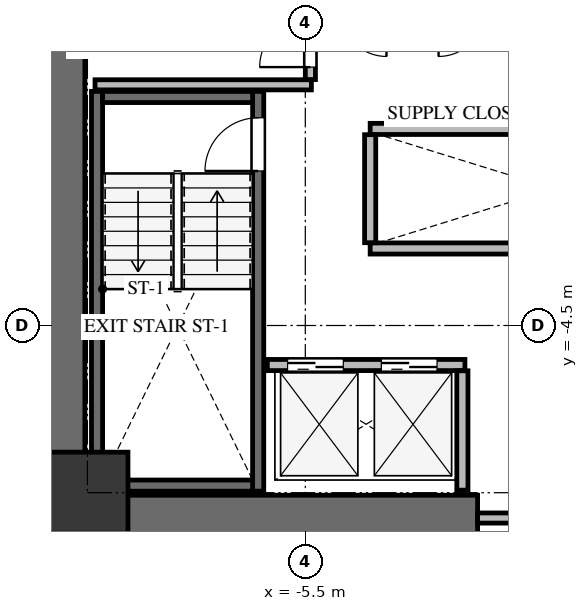
"""IFC4 building model, lengths in metres.
Left out: names, types, materials, properties, quantities, classifications, styles, units other than length and angle.
Written with IfcOpenShell. Run it as: python <this file> out.ifc"""

import sys

from ifc_helpers import new_model, si_unit, direction, frame, frame_2d, origin, origin_2d, place, context, subcontext, project, spatial, rectangle, extrude, source, transform, mapped, element, fill, save


model = new_model("IFC4")
c1 = context("Model", 3, precision=1e-05, world=origin(), true_north=direction((0.0, 1.0)))
c2 = subcontext(c1, "Body", "Model", "MODEL_VIEW")
j1 = project(units=[si_unit("LENGTHUNIT", "METRE"), si_unit("PLANEANGLEUNIT", "RADIAN")], contexts=[c1])
p1 = place(None, origin())
s1 = spatial("IfcSite", under=j1, at=p1, CompositionType="ELEMENT")
p2 = place(p1, origin())
s2 = spatial("IfcBuilding", under=s1, at=p2, CompositionType="ELEMENT")
p3 = place(p2, frame((0.0, 0.0, 78.3)))
s3 = spatial("IfcBuildingStorey", under=s2, at=p3, CompositionType="ELEMENT", Elevation=78.3)
p4 = place(p3, frame((-10.3, -8.75, 0.0), z_axis=(0.0, 0.0, 1.0), x_axis=(0.0, 1.0, 0.0)))
e1 = element("IfcWall", 1, at=p4, inside=s3, PredefinedType="SHEAR", context=c2, shape_type="SweptSolid", body=[
    extrude(rectangle(XDim=17.5, YDim=0.9, at=frame_2d((8.75, 0.0))), origin(), (0.0, 0.0, 1.0), 3.0),
])
p5 = place(p3, frame((-9.85, -8.3, 0.0), z_axis=(0.0, 0.0, 1.0), x_axis=(1.0, 0.0, 0.0)))
e2 = element("IfcWall", 2, at=p5, inside=s3, PredefinedType="SHEAR", context=c2, shape_type="SweptSolid", body=[
    extrude(rectangle(XDim=7.75, YDim=0.9, at=frame_2d((3.875, 0.0))), origin(), (0.0, 0.0, 1.0), 3.0),
])
p6 = place(p3, frame((-6.43, -7.77, -0.24), z_axis=(0.0, 0.0, 1.0), x_axis=(0.0, 1.0, 0.0)))
e3 = element("IfcWall", 3, at=p6, inside=s3, PredefinedType="SHEAR", context=c2, shape_type="SweptSolid", body=[
    extrude(rectangle(XDim=7.89, YDim=0.22, at=frame_2d((3.945, 0.0))), origin(), (0.0, 0.0, 1.0), 3.0),
])
p7 = place(p6, frame((6.32, 0.0, 0.0)))
e4 = element("IfcOpeningElement", 4, at=p7, cuts=e3, PredefinedType="OPENING", context=c2, shape_type="SweptSolid", body=[
    extrude(rectangle(XDim=1.05, YDim=2.15, at=frame_2d((0.525, 1.075))), frame((0.0, 0.12, 0.0), z_axis=(0.0, -1.0, 0.0), x_axis=(1.0, 0.0, 0.0)), (0.0, 0.0, 1.0), 0.24),
])
p8 = place(p3, frame((-9.61, 0.12, -0.24), z_axis=(0.0, 0.0, 1.0), x_axis=(0.0, -1.0, 0.0)))
e5 = element("IfcWall", 5, at=p8, inside=s3, PredefinedType="SHEAR", context=c2, shape_type="SweptSolid", body=[
    extrude(rectangle(XDim=7.89, YDim=0.22, at=frame_2d((3.945, 0.0))), origin(), (0.0, 0.0, 1.0), 3.0),
])
for number, where, z_axis, x_axis in (
    (6, (-9.5, -7.66, -0.24), (0.0, 0.0, 1.0), (1.0, 0.0, 0.0)),
    (7, (-6.54, 0.01, -0.24), (0.0, 0.0, 1.0), (-1.0, 0.0, 0.0)),
):
    element("IfcWall", number, at=place(p3, frame(where, z_axis=z_axis, x_axis=x_axis)), inside=s3, PredefinedType="SHEAR", context=c2, shape_type="SweptSolid", body=[
        extrude(rectangle(XDim=2.96, YDim=0.22, at=frame_2d((1.48, 0.0))), origin(), (0.0, 0.0, 1.0), 3.0),
    ])
m1 = source(origin(), c2, "Body", "SweptSolid", [
    extrude(rectangle(XDim=1.6, YDim=1.6, at=origin_2d()), origin(), (0.0, 0.0, 1.0), 3.0),
])
p9 = place(p3, frame((-9.8, -7.8, -0.24), z_axis=(0.0, 0.0, 1.0), x_axis=(1.0, 0.0, 0.0)))
e8 = element("IfcColumn", 8, at=p9, inside=s3, PredefinedType="COLUMN", context=c2, shape_type="MappedRepresentation", body=[
    mapped(m1, transform((0.0, 0.0, 0.0), x_axis=(1.0, 0.0, 0.0), y_axis=(0.0, 1.0, 0.0), z_axis=(0.0, 0.0, 1.0), scale=1.0)),
])
p10 = place(p3, frame((-2.1, -8.3, 0.0), z_axis=(0.0, 0.0, 1.0), x_axis=(1.0, 0.0, 0.0)))
e9 = element("IfcWall", 9, at=p10, inside=s3, PredefinedType="SOLIDWALL", context=c2, shape_type="SweptSolid", body=[
    extrude(rectangle(XDim=4.2, YDim=0.2, at=frame_2d((2.1, 0.0))), origin(), (0.0, 0.0, 1.0), 2.745),
])
p11 = place(p10, frame((1.2, 0.0, 0.0)))
e10 = element("IfcOpeningElement", 10, at=p11, cuts=e9, PredefinedType="OPENING", context=c2, shape_type="SweptSolid", body=[
    extrude(rectangle(XDim=1.8, YDim=2.15, at=frame_2d((0.9, 1.075))), frame((0.0, 0.11, 0.0), z_axis=(0.0, -1.0, 0.0), x_axis=(1.0, 0.0, 0.0)), (0.0, 0.0, 1.0), 0.22),
])
p12 = place(p3, frame((-9.65, 0.25, 0.0), z_axis=(0.0, 0.0, 1.0), x_axis=(1.0, 0.0, 0.0)))
e11 = element("IfcWall", 11, at=p12, inside=s3, PredefinedType="SOLIDWALL", context=c2, shape_type="SweptSolid", body=[
    extrude(rectangle(XDim=4.27, YDim=0.2, at=frame_2d((2.135, 0.0))), origin(), (0.0, 0.0, 1.0), 2.745),
])
p13 = place(p3, frame((-5.4, 0.354, 0.0), z_axis=(0.0, 0.0, 1.0), x_axis=(0.0, 1.0, 0.0)))
e12 = element("IfcWall", 12, at=p13, inside=s3, PredefinedType="SOLIDWALL", context=c2, shape_type="SweptSolid", body=[
    extrude(rectangle(XDim=4.026, YDim=0.2, at=frame_2d((2.013, 0.0))), origin(), (0.0, 0.0, 1.0), 2.745),
])
p14 = place(p13, frame((0.246, 0.0, 0.0)))
e13 = element("IfcOpeningElement", 13, at=p14, cuts=e12, PredefinedType="OPENING", context=c2, shape_type="SweptSolid", body=[
    extrude(rectangle(XDim=1.0, YDim=2.15, at=frame_2d((0.5, 1.075))), frame((0.0, 0.11, 0.0), z_axis=(0.0, -1.0, 0.0), x_axis=(1.0, 0.0, 0.0)), (0.0, 0.0, 1.0), 0.22),
])
p15 = place(p3, frame((-6.25, -5.28, 0.0), z_axis=(0.0, 0.0, 1.0), x_axis=(1.0, 0.0, 0.0)))
e14 = element("IfcWall", 14, at=p15, inside=s3, PredefinedType="SOLIDWALL", context=c2, shape_type="SweptSolid", body=[
    extrude(rectangle(XDim=3.9, YDim=0.22, at=frame_2d((1.95, 0.0))), origin(), (0.0, 0.0, 1.0), 2.745),
])
p16 = place(p15, frame((0.4, 0.0, 0.0)))
e15 = element("IfcOpeningElement", 15, at=p16, cuts=e14, PredefinedType="OPENING", context=c2, shape_type="SweptSolid", body=[
    extrude(rectangle(XDim=1.1, YDim=2.15, at=frame_2d((0.55, 1.075))), frame((0.0, 0.12, 0.0), z_axis=(0.0, -1.0, 0.0), x_axis=(1.0, 0.0, 0.0)), (0.0, 0.0, 1.0), 0.24),
])
p17 = place(p15, frame((2.25, 0.0, 0.0)))
e16 = element("IfcOpeningElement", 16, at=p17, cuts=e14, PredefinedType="OPENING", context=c2, shape_type="SweptSolid", body=[
    extrude(rectangle(XDim=1.1, YDim=2.15, at=frame_2d((0.55, 1.075))), frame((0.0, 0.12, 0.0), z_axis=(0.0, -1.0, 0.0), x_axis=(1.0, 0.0, 0.0)), (0.0, 0.0, 1.0), 0.24),
])
p18 = place(p3, frame((-2.4, -7.75, 0.0), z_axis=(0.0, 0.0, 1.0), x_axis=(0.0, 1.0, 0.0)))
e17 = element("IfcWall", 17, at=p18, inside=s3, PredefinedType="SOLIDWALL", context=c2, shape_type="SweptSolid", body=[
    extrude(rectangle(XDim=2.356, YDim=0.22, at=frame_2d((1.178, 0.0))), origin(), (0.0, 0.0, 1.0), 2.745),
])
for number, where, z_axis, x_axis in (
    (18, (-4.22, -2.98, 0.0), (0.0, 0.0, 1.0), (1.0, 0.0, 0.0)),
    (19, (-4.22, -0.62, 0.0), (0.0, 0.0, 1.0), (1.0, 0.0, 0.0)),
):
    element("IfcWall", number, at=place(p3, frame(where, z_axis=z_axis, x_axis=x_axis)), inside=s3, PredefinedType="SOLIDWALL", context=c2, shape_type="SweptSolid", body=[
        extrude(rectangle(XDim=7.24, YDim=0.22, at=frame_2d((3.62, 0.0))), origin(), (0.0, 0.0, 1.0), 2.745),
    ])
p19 = place(p3, frame((-4.22, -2.866, 0.0), z_axis=(0.0, 0.0, 1.0), x_axis=(0.0, 1.0, 0.0)))
e20 = element("IfcWall", 20, at=p19, inside=s3, PredefinedType="SOLIDWALL", context=c2, shape_type="SweptSolid", body=[
    extrude(rectangle(XDim=2.132, YDim=0.22, at=frame_2d((1.066, 0.0))), origin(), (0.0, 0.0, 1.0), 2.745),
])
m2 = source(origin(), c2, "Body", "SweptSolid", [
    extrude(rectangle(XDim=1.05, YDim=2.15, at=frame_2d((0.525, 1.075))), frame((0.0, 0.025, 0.0), z_axis=(0.0, -1.0, 0.0), x_axis=(1.0, 0.0, 0.0)), (0.0, 0.0, 1.0), 0.05),
])
p20 = place(p7, origin())
e21 = element("IfcDoor", 21, at=p20, inside=s3, OperationType="SINGLE_SWING_LEFT", PredefinedType="DOOR", context=c2, shape_type="MappedRepresentation", body=[
    mapped(m2, transform((0.0, 0.0, 0.0), x_axis=(1.0, 0.0, 0.0), y_axis=(0.0, 1.0, 0.0), z_axis=(0.0, 0.0, 1.0), scale=1.0)),
])
fill(e4, e21)
m3 = source(origin(), c2, "Body", "SweptSolid", [
    extrude(rectangle(XDim=1.0, YDim=2.15, at=frame_2d((0.5, 1.075))), frame((0.0, 0.025, 0.0), z_axis=(0.0, -1.0, 0.0), x_axis=(1.0, 0.0, 0.0)), (0.0, 0.0, 1.0), 0.05),
])
p21 = place(p14, origin())
e22 = element("IfcDoor", 22, at=p21, inside=s3, OperationType="SINGLE_SWING_LEFT", PredefinedType="DOOR", context=c2, shape_type="MappedRepresentation", body=[
    mapped(m3, transform((0.0, 0.0, 0.0), x_axis=(1.0, 0.0, 0.0), y_axis=(0.0, 1.0, 0.0), z_axis=(0.0, 0.0, 1.0), scale=1.0)),
])
fill(e13, e22)
m4 = source(origin(), c2, "Body", "SweptSolid", [
    extrude(rectangle(XDim=1.1, YDim=2.15, at=frame_2d((0.55, 1.075))), frame((0.0, 0.025, 0.0), z_axis=(0.0, -1.0, 0.0), x_axis=(1.0, 0.0, 0.0)), (0.0, 0.0, 1.0), 0.05),
])
p22 = place(p16, origin())
e23 = element("IfcDoor", 23, at=p22, inside=s3, OperationType="DOUBLE_DOOR_SLIDING", PredefinedType="DOOR", context=c2, shape_type="MappedRepresentation", body=[
    mapped(m4, transform((0.0, 0.0, 0.0), x_axis=(1.0, 0.0, 0.0), y_axis=(0.0, 1.0, 0.0), z_axis=(0.0, 0.0, 1.0), scale=1.0)),
])
fill(e15, e23)
p23 = place(p17, origin())
e24 = element("IfcDoor", 24, at=p23, inside=s3, OperationType="DOUBLE_DOOR_SLIDING", PredefinedType="DOOR", context=c2, shape_type="MappedRepresentation", body=[
    mapped(m4, transform((0.0, 0.0, 0.0), x_axis=(1.0, 0.0, 0.0), y_axis=(0.0, 1.0, 0.0), z_axis=(0.0, 0.0, 1.0), scale=1.0)),
])
fill(e16, e24)
save(model, sys.argv[1])
